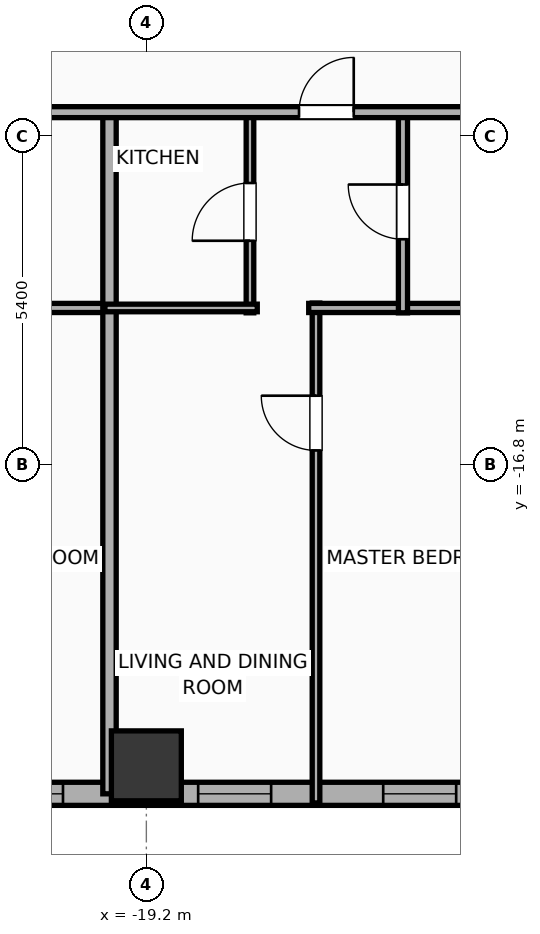
"""IFC4 building model, lengths in metres.
Left out: names, types, materials, properties, quantities, classifications, styles, units other than length and angle.
Written with IfcOpenShell. Run it as: python <this file> out.ifc"""

import sys

from ifc_helpers import new_model, si_unit, direction, frame, frame_2d, origin, origin_2d, place, context, subcontext, project, spatial, rectangle, hollow_rectangle, extrude, element, fill, save


model = new_model("IFC4")
c1 = context("Model", 3, precision=1e-05, world=origin(), true_north=direction((0.0, 1.0)))
c2 = subcontext(c1, "Body", "Model", "MODEL_VIEW")
j1 = project(units=[si_unit("LENGTHUNIT", "METRE"), si_unit("PLANEANGLEUNIT", "RADIAN")], contexts=[c1])
p1 = place(None, origin())
s1 = spatial("IfcSite", under=j1, at=p1, CompositionType="ELEMENT")
p2 = place(p1, origin())
s2 = spatial("IfcBuilding", under=s1, at=p2, CompositionType="ELEMENT")
p3 = place(p2, frame((0.0, 0.0, 65.0)))
s3 = spatial("IfcBuildingStorey", under=s2, at=p3, CompositionType="ELEMENT", Elevation=65.0)
p4 = place(p3, frame((-19.2, -21.75, 0.0), z_axis=(0.0, 0.0, 1.0), x_axis=(1.0, 0.0, 0.0)))
e1 = element("IfcColumn", 1, at=p4, inside=s3, PredefinedType="COLUMN", context=c2, shape_type="SweptSolid", body=[
    extrude(hollow_rectangle(XDim=1.15, YDim=1.15, WallThickness=0.04, at=origin_2d()), origin(), (0.0, 0.0, 1.0), 3.9),
])
p5 = place(p3, frame((22.381, -22.21, 0.0), z_axis=(0.0, 0.0, 1.0), x_axis=(-1.0, 0.0, 0.0)))
e2 = element("IfcWall", 2, at=p5, inside=s3, PredefinedType="ELEMENTEDWALL", context=c2, shape_type="SweptSolid", body=[
    extrude(rectangle(XDim=51.963, YDim=0.38, at=frame_2d((25.981, 0.0))), origin(), (0.0, 0.0, 1.0), 3.65),
])
p6 = place(p5, frame((25.631, 0.0, 0.75)))
e3 = element("IfcOpeningElement", 3, at=p6, cuts=e2, PredefinedType="OPENING", context=c2, shape_type="SweptSolid", body=[
    extrude(rectangle(XDim=2.4, YDim=2.1, at=frame_2d((1.2, 1.05))), frame((0.0, 0.2, 0.0), z_axis=(0.0, -1.0, 0.0), x_axis=(1.0, 0.0, 0.0)), (0.0, 0.0, 1.0), 0.4),
])
p7 = place(p5, frame((42.952, 0.0, 0.75)))
e4 = element("IfcOpeningElement", 4, at=p7, cuts=e2, PredefinedType="OPENING", context=c2, shape_type="SweptSolid", body=[
    extrude(rectangle(XDim=2.4, YDim=2.1, at=frame_2d((1.2, 1.05))), frame((0.0, 0.2, 0.0), z_axis=(0.0, -1.0, 0.0), x_axis=(1.0, 0.0, 0.0)), (0.0, 0.0, 1.0), 0.4),
])
p8 = place(p5, frame((49.433, 0.0, 0.75)))
e5 = element("IfcOpeningElement", 5, at=p8, cuts=e2, PredefinedType="OPENING", context=c2, shape_type="SweptSolid", body=[
    extrude(rectangle(XDim=1.2, YDim=2.05, at=frame_2d((0.6, 1.025))), frame((0.0, 0.2, 0.0), z_axis=(0.0, -1.0, 0.0), x_axis=(1.0, 0.0, 0.0)), (0.0, 0.0, 1.0), 0.4),
])
p9 = place(p5, frame((46.695, 0.0, 0.75)))
e6 = element("IfcOpeningElement", 6, at=p9, cuts=e2, PredefinedType="OPENING", context=c2, shape_type="SweptSolid", body=[
    extrude(rectangle(XDim=1.2, YDim=2.05, at=frame_2d((0.6, 1.025))), frame((0.0, 0.2, 0.0), z_axis=(0.0, -1.0, 0.0), x_axis=(1.0, 0.0, 0.0)), (0.0, 0.0, 1.0), 0.4),
])
p10 = place(p5, frame((39.529, 0.0, 0.75)))
e7 = element("IfcOpeningElement", 7, at=p10, cuts=e2, PredefinedType="OPENING", context=c2, shape_type="SweptSolid", body=[
    extrude(rectangle(XDim=1.2, YDim=2.05, at=frame_2d((0.6, 1.025))), frame((0.0, 0.2, 0.0), z_axis=(0.0, -1.0, 0.0), x_axis=(1.0, 0.0, 0.0)), (0.0, 0.0, 1.0), 0.4),
])
p11 = place(p5, frame((36.486, 0.0, 0.75)))
e8 = element("IfcOpeningElement", 8, at=p11, cuts=e2, PredefinedType="OPENING", context=c2, shape_type="SweptSolid", body=[
    extrude(rectangle(XDim=1.2, YDim=2.05, at=frame_2d((0.6, 1.025))), frame((0.0, 0.2, 0.0), z_axis=(0.0, -1.0, 0.0), x_axis=(1.0, 0.0, 0.0)), (0.0, 0.0, 1.0), 0.4),
])
p12 = place(p5, frame((32.986, 0.0, 0.75)))
e9 = element("IfcOpeningElement", 9, at=p12, cuts=e2, PredefinedType="OPENING", context=c2, shape_type="SweptSolid", body=[
    extrude(rectangle(XDim=1.2, YDim=2.05, at=frame_2d((0.6, 1.025))), frame((0.0, 0.2, 0.0), z_axis=(0.0, -1.0, 0.0), x_axis=(1.0, 0.0, 0.0)), (0.0, 0.0, 1.0), 0.4),
])
p13 = place(p5, frame((29.126, 0.0, 0.75)))
e10 = element("IfcOpeningElement", 10, at=p13, cuts=e2, PredefinedType="OPENING", context=c2, shape_type="SweptSolid", body=[
    extrude(rectangle(XDim=1.2, YDim=2.05, at=frame_2d((0.6, 1.025))), frame((0.0, 0.2, 0.0), z_axis=(0.0, -1.0, 0.0), x_axis=(1.0, 0.0, 0.0)), (0.0, 0.0, 1.0), 0.4),
])
p14 = place(p5, frame((22.486, 0.0, 0.75)))
e11 = element("IfcOpeningElement", 11, at=p14, cuts=e2, PredefinedType="OPENING", context=c2, shape_type="SweptSolid", body=[
    extrude(rectangle(XDim=1.2, YDim=2.05, at=frame_2d((0.6, 1.025))), frame((0.0, 0.2, 0.0), z_axis=(0.0, -1.0, 0.0), x_axis=(1.0, 0.0, 0.0)), (0.0, 0.0, 1.0), 0.4),
])
p15 = place(p5, frame((18.746, 0.0, 0.75)))
e12 = element("IfcOpeningElement", 12, at=p15, cuts=e2, PredefinedType="OPENING", context=c2, shape_type="SweptSolid", body=[
    extrude(rectangle(XDim=1.2, YDim=2.05, at=frame_2d((0.6, 1.025))), frame((0.0, 0.2, 0.0), z_axis=(0.0, -1.0, 0.0), x_axis=(1.0, 0.0, 0.0)), (0.0, 0.0, 1.0), 0.4),
])
p16 = place(p5, frame((15.486, 0.0, 0.75)))
e13 = element("IfcOpeningElement", 13, at=p16, cuts=e2, PredefinedType="OPENING", context=c2, shape_type="SweptSolid", body=[
    extrude(rectangle(XDim=1.2, YDim=2.05, at=frame_2d((0.6, 1.025))), frame((0.0, 0.2, 0.0), z_axis=(0.0, -1.0, 0.0), x_axis=(1.0, 0.0, 0.0)), (0.0, 0.0, 1.0), 0.4),
])
p17 = place(p5, frame((11.986, 0.0, 0.75)))
e14 = element("IfcOpeningElement", 14, at=p17, cuts=e2, PredefinedType="OPENING", context=c2, shape_type="SweptSolid", body=[
    extrude(rectangle(XDim=1.2, YDim=2.05, at=frame_2d((0.6, 1.025))), frame((0.0, 0.2, 0.0), z_axis=(0.0, -1.0, 0.0), x_axis=(1.0, 0.0, 0.0)), (0.0, 0.0, 1.0), 0.4),
])
p18 = place(p5, frame((8.366, 0.0, 0.75)))
e15 = element("IfcOpeningElement", 15, at=p18, cuts=e2, PredefinedType="OPENING", context=c2, shape_type="SweptSolid", body=[
    extrude(rectangle(XDim=1.2, YDim=2.05, at=frame_2d((0.6, 1.025))), frame((0.0, 0.2, 0.0), z_axis=(0.0, -1.0, 0.0), x_axis=(1.0, 0.0, 0.0)), (0.0, 0.0, 1.0), 0.4),
])
p19 = place(p5, frame((5.082, 0.0, 0.75)))
e16 = element("IfcOpeningElement", 16, at=p19, cuts=e2, PredefinedType="OPENING", context=c2, shape_type="SweptSolid", body=[
    extrude(rectangle(XDim=1.2, YDim=2.05, at=frame_2d((0.6, 1.025))), frame((0.0, 0.2, 0.0), z_axis=(0.0, -1.0, 0.0), x_axis=(1.0, 0.0, 0.0)), (0.0, 0.0, 1.0), 0.4),
])
p20 = place(p5, frame((2.277, 0.0, 0.75)))
e17 = element("IfcOpeningElement", 17, at=p20, cuts=e2, PredefinedType="OPENING", context=c2, shape_type="SweptSolid", body=[
    extrude(rectangle(XDim=1.2, YDim=2.05, at=frame_2d((0.6, 1.025))), frame((0.0, 0.2, 0.0), z_axis=(0.0, -1.0, 0.0), x_axis=(1.0, 0.0, 0.0)), (0.0, 0.0, 1.0), 0.4),
])
p21 = place(p5, frame((1.071, 0.0, 0.75)))
e18 = element("IfcOpeningElement", 18, at=p21, cuts=e2, PredefinedType="OPENING", context=c2, shape_type="SweptSolid", body=[
    extrude(rectangle(XDim=0.52, YDim=2.05, at=frame_2d((0.26, 1.025))), frame((0.0, 0.2, 0.0), z_axis=(0.0, -1.0, 0.0), x_axis=(1.0, 0.0, 0.0)), (0.0, 0.0, 1.0), 0.4),
])
p22 = place(p3, frame((-23.336, -14.22, 0.0), z_axis=(0.0, 0.0, 1.0), x_axis=(1.0, 0.0, 0.0)))
e19 = element("IfcWall", 19, at=p22, inside=s3, PredefinedType="PLUMBINGWALL", context=c2, shape_type="SweptSolid", body=[
    extrude(rectangle(XDim=3.605, YDim=0.15, at=frame_2d((1.802, 0.0))), origin(), (0.0, 0.0, 1.0), 3.65),
])
p23 = place(p3, frame((-19.806, -22.21, 0.0), z_axis=(0.0, 0.0, 1.0), x_axis=(0.0, 1.0, 0.0)))
e20 = element("IfcWall", 20, at=p23, inside=s3, PredefinedType="PARTITIONING", context=c2, shape_type="SweptSolid", body=[
    extrude(rectangle(XDim=11.29, YDim=0.22, at=frame_2d((5.645, 0.0))), origin(), (0.0, 0.0, 1.0), 3.65),
])
p24 = place(p3, frame((-16.41, -22.36, 0.0), z_axis=(0.0, 0.0, 1.0), x_axis=(0.0, 1.0, 0.0)))
e21 = element("IfcWall", 21, at=p24, inside=s3, PredefinedType="PARTITIONING", context=c2, shape_type="SweptSolid", body=[
    extrude(rectangle(XDim=8.22, YDim=0.125, at=frame_2d((4.11, 0.0))), origin(), (0.0, 0.0, 1.0), 3.65),
])
p25 = place(p24, frame((5.797, 0.0, 0.0)))
e22 = element("IfcOpeningElement", 22, at=p25, cuts=e21, PredefinedType="OPENING", context=c2, shape_type="SweptSolid", body=[
    extrude(rectangle(XDim=0.9, YDim=2.05, at=frame_2d((0.45, 1.025))), frame((0.0, 0.073, 0.0), z_axis=(0.0, -1.0, 0.0), x_axis=(1.0, 0.0, 0.0)), (0.0, 0.0, 1.0), 0.145),
])
p26 = place(p3, frame((-16.53, -14.22, 0.0), z_axis=(0.0, 0.0, 1.0), x_axis=(1.0, 0.0, 0.0)))
e23 = element("IfcWall", 23, at=p26, inside=s3, PredefinedType="PLUMBINGWALL", context=c2, shape_type="SweptSolid", body=[
    extrude(rectangle(XDim=3.605, YDim=0.15, at=frame_2d((1.802, 0.0))), origin(), (0.0, 0.0, 1.0), 3.65),
])
p27 = place(p3, frame((-17.496, -14.3, 0.0), z_axis=(0.0, 0.0, 1.0), x_axis=(0.0, 1.0, 0.0)))
e24 = element("IfcWall", 24, at=p27, inside=s3, PredefinedType="PARTITIONING", context=c2, shape_type="SweptSolid", body=[
    extrude(rectangle(XDim=3.32, YDim=0.125, at=frame_2d((1.66, 0.0))), origin(), (0.0, 0.0, 1.0), 3.65),
])
p28 = place(p27, frame((1.185, 0.0, 0.0)))
e25 = element("IfcOpeningElement", 25, at=p28, cuts=e24, PredefinedType="OPENING", context=c2, shape_type="SweptSolid", body=[
    extrude(rectangle(XDim=0.95, YDim=2.05, at=frame_2d((0.475, 1.025))), frame((0.0, 0.073, 0.0), z_axis=(0.0, -1.0, 0.0), x_axis=(1.0, 0.0, 0.0)), (0.0, 0.0, 1.0), 0.145),
])
p29 = place(p3, frame((-19.881, -14.22, 0.0), z_axis=(0.0, 0.0, 1.0), x_axis=(1.0, 0.0, 0.0)))
e26 = element("IfcWall", 26, at=p29, inside=s3, PredefinedType="PARTITIONING", context=c2, shape_type="SweptSolid", body=[
    extrude(rectangle(XDim=2.505, YDim=0.125, at=frame_2d((1.252, 0.0))), origin(), (0.0, 0.0, 1.0), 3.65),
])
p30 = place(p3, frame((-14.98, -14.3, 0.0), z_axis=(0.0, 0.0, 1.0), x_axis=(0.0, 1.0, 0.0)))
e27 = element("IfcWall", 27, at=p30, inside=s3, PredefinedType="PLUMBINGWALL", context=c2, shape_type="SweptSolid", body=[
    extrude(rectangle(XDim=3.32, YDim=0.15, at=frame_2d((1.66, 0.0))), origin(), (0.0, 0.0, 1.0), 3.65),
])
p31 = place(p30, frame((1.21, 0.0, 0.0)))
e28 = element("IfcOpeningElement", 28, at=p31, cuts=e27, PredefinedType="OPENING", context=c2, shape_type="SweptSolid", body=[
    extrude(rectangle(XDim=0.9, YDim=2.05, at=frame_2d((0.45, 1.025))), frame((0.0, 0.085, 0.0), z_axis=(0.0, -1.0, 0.0), x_axis=(1.0, 0.0, 0.0)), (0.0, 0.0, 1.0), 0.17),
])
p32 = place(p3, frame((-33.41, -11.0, 0.0), z_axis=(0.0, 0.0, 1.0), x_axis=(1.0, 0.0, 0.0)))
e29 = element("IfcWall", 29, at=p32, inside=s3, PredefinedType="PARTITIONING", context=c2, shape_type="SweptSolid", body=[
    extrude(rectangle(XDim=59.62, YDim=0.18, at=frame_2d((29.81, 0.0))), origin(), (0.0, 0.0, 1.0), 3.65),
])
p33 = place(p32, frame((3.08, 0.0, 0.0)))
e30 = element("IfcOpeningElement", 30, at=p33, cuts=e29, PredefinedType="OPENING", context=c2, shape_type="SweptSolid", body=[
    extrude(rectangle(XDim=0.9, YDim=2.05, at=frame_2d((0.45, 1.025))), frame((0.0, 0.1, 0.0), z_axis=(0.0, -1.0, 0.0), x_axis=(1.0, 0.0, 0.0)), (0.0, 0.0, 1.0), 0.2),
])
p34 = place(p32, frame((9.918, 0.0, 0.0)))
e31 = element("IfcOpeningElement", 31, at=p34, cuts=e29, PredefinedType="OPENING", context=c2, shape_type="SweptSolid", body=[
    extrude(rectangle(XDim=0.9, YDim=2.05, at=frame_2d((0.45, 1.025))), frame((0.0, 0.1, 0.0), z_axis=(0.0, -1.0, 0.0), x_axis=(1.0, 0.0, 0.0)), (0.0, 0.0, 1.0), 0.2),
])
p35 = place(p32, frame((16.721, 0.0, 0.0)))
e32 = element("IfcOpeningElement", 32, at=p35, cuts=e29, PredefinedType="OPENING", context=c2, shape_type="SweptSolid", body=[
    extrude(rectangle(XDim=0.9, YDim=2.05, at=frame_2d((0.45, 1.025))), frame((0.0, 0.1, 0.0), z_axis=(0.0, -1.0, 0.0), x_axis=(1.0, 0.0, 0.0)), (0.0, 0.0, 1.0), 0.2),
])
p36 = place(p32, frame((23.625, 0.0, 0.0)))
e33 = element("IfcOpeningElement", 33, at=p36, cuts=e29, PredefinedType="OPENING", context=c2, shape_type="SweptSolid", body=[
    extrude(rectangle(XDim=0.9, YDim=2.05, at=frame_2d((0.45, 1.025))), frame((0.0, 0.1, 0.0), z_axis=(0.0, -1.0, 0.0), x_axis=(1.0, 0.0, 0.0)), (0.0, 0.0, 1.0), 0.2),
])
p37 = place(p32, frame((30.624, 0.0, 0.0)))
e34 = element("IfcOpeningElement", 34, at=p37, cuts=e29, PredefinedType="OPENING", context=c2, shape_type="SweptSolid", body=[
    extrude(rectangle(XDim=0.9, YDim=2.05, at=frame_2d((0.45, 1.025))), frame((0.0, 0.1, 0.0), z_axis=(0.0, -1.0, 0.0), x_axis=(1.0, 0.0, 0.0)), (0.0, 0.0, 1.0), 0.2),
])
p38 = place(p32, frame((37.623, 0.0, 0.0)))
e35 = element("IfcOpeningElement", 35, at=p38, cuts=e29, PredefinedType="OPENING", context=c2, shape_type="SweptSolid", body=[
    extrude(rectangle(XDim=0.9, YDim=2.05, at=frame_2d((0.45, 1.025))), frame((0.0, 0.1, 0.0), z_axis=(0.0, -1.0, 0.0), x_axis=(1.0, 0.0, 0.0)), (0.0, 0.0, 1.0), 0.2),
])
p39 = place(p32, frame((44.623, 0.0, 0.0)))
e36 = element("IfcOpeningElement", 36, at=p39, cuts=e29, PredefinedType="OPENING", context=c2, shape_type="SweptSolid", body=[
    extrude(rectangle(XDim=0.9, YDim=2.05, at=frame_2d((0.45, 1.025))), frame((0.0, 0.1, 0.0), z_axis=(0.0, -1.0, 0.0), x_axis=(1.0, 0.0, 0.0)), (0.0, 0.0, 1.0), 0.2),
])
p40 = place(p32, frame((49.565, 0.0, 0.0)))
e37 = element("IfcOpeningElement", 37, at=p40, cuts=e29, PredefinedType="OPENING", context=c2, shape_type="SweptSolid", body=[
    extrude(rectangle(XDim=1.15, YDim=2.05, at=frame_2d((0.575, 1.025))), frame((0.0, 0.1, 0.0), z_axis=(0.0, -1.0, 0.0), x_axis=(1.0, 0.0, 0.0)), (0.0, 0.0, 1.0), 0.2),
])
p41 = place(p32, frame((56.583, 0.0, 0.0)))
e38 = element("IfcOpeningElement", 38, at=p41, cuts=e29, PredefinedType="OPENING", context=c2, shape_type="SweptSolid", body=[
    extrude(rectangle(XDim=0.9, YDim=2.05, at=frame_2d((0.45, 1.025))), frame((0.0, 0.1, 0.0), z_axis=(0.0, -1.0, 0.0), x_axis=(1.0, 0.0, 0.0)), (0.0, 0.0, 1.0), 0.2),
])
p42 = place(p7, origin())
e39 = element("IfcWindow", 39, at=p42, inside=s3, PartitioningType="SINGLE_PANEL", PredefinedType="WINDOW", context=c2, shape_type="SweptSolid", body=[
    extrude(rectangle(XDim=2.4, YDim=2.1, at=frame_2d((1.2, 1.05))), frame((0.0, 0.03, 0.0), z_axis=(0.0, -1.0, 0.0), x_axis=(1.0, 0.0, 0.0)), (0.0, 0.0, 1.0), 0.06),
])
fill(e4, e39)
p43 = place(p10, origin())
e40 = element("IfcWindow", 40, at=p43, inside=s3, PartitioningType="SINGLE_PANEL", PredefinedType="WINDOW", context=c2, shape_type="SweptSolid", body=[
    extrude(rectangle(XDim=1.2, YDim=2.05, at=frame_2d((0.6, 1.025))), frame((0.0, 0.03, 0.0), z_axis=(0.0, -1.0, 0.0), x_axis=(1.0, 0.0, 0.0)), (0.0, 0.0, 1.0), 0.06),
])
fill(e7, e40)
p44 = place(p11, origin())
e41 = element("IfcWindow", 41, at=p44, inside=s3, PartitioningType="SINGLE_PANEL", PredefinedType="WINDOW", context=c2, shape_type="SweptSolid", body=[
    extrude(rectangle(XDim=1.2, YDim=2.05, at=frame_2d((0.6, 1.025))), frame((0.0, 0.03, 0.0), z_axis=(0.0, -1.0, 0.0), x_axis=(1.0, 0.0, 0.0)), (0.0, 0.0, 1.0), 0.06),
])
fill(e8, e41)
p45 = place(p25, origin())
e42 = element("IfcDoor", 42, at=p45, inside=s3, OperationType="SINGLE_SWING_RIGHT", PredefinedType="DOOR", context=c2, shape_type="SweptSolid", body=[
    extrude(rectangle(XDim=0.9, YDim=2.05, at=frame_2d((0.45, 1.025))), frame((0.0, 0.025, 0.0), z_axis=(0.0, -1.0, 0.0), x_axis=(1.0, 0.0, 0.0)), (0.0, 0.0, 1.0), 0.05),
])
fill(e22, e42)
p46 = place(p28, origin())
e43 = element("IfcDoor", 43, at=p46, inside=s3, OperationType="SINGLE_SWING_LEFT", PredefinedType="DOOR", context=c2, shape_type="SweptSolid", body=[
    extrude(rectangle(XDim=0.95, YDim=2.05, at=frame_2d((0.475, 1.025))), frame((0.0, 0.025, 0.0), z_axis=(0.0, -1.0, 0.0), x_axis=(1.0, 0.0, 0.0)), (0.0, 0.0, 1.0), 0.05),
])
fill(e25, e43)
p47 = place(p31, origin())
e44 = element("IfcDoor", 44, at=p47, inside=s3, OperationType="SINGLE_SWING_RIGHT", PredefinedType="DOOR", context=c2, shape_type="SweptSolid", body=[
    extrude(rectangle(XDim=0.9, YDim=2.05, at=frame_2d((0.45, 1.025))), frame((0.0, 0.025, 0.0), z_axis=(0.0, -1.0, 0.0), x_axis=(1.0, 0.0, 0.0)), (0.0, 0.0, 1.0), 0.05),
])
fill(e28, e44)
p48 = place(p35, origin())
e45 = element("IfcDoor", 45, at=p48, inside=s3, OperationType="SINGLE_SWING_RIGHT", PredefinedType="DOOR", context=c2, shape_type="SweptSolid", body=[
    extrude(rectangle(XDim=0.9, YDim=2.05, at=frame_2d((0.45, 1.025))), frame((0.0, 0.025, 0.0), z_axis=(0.0, -1.0, 0.0), x_axis=(1.0, 0.0, 0.0)), (0.0, 0.0, 1.0), 0.05),
])
fill(e32, e45)
save(model, sys.argv[1])
